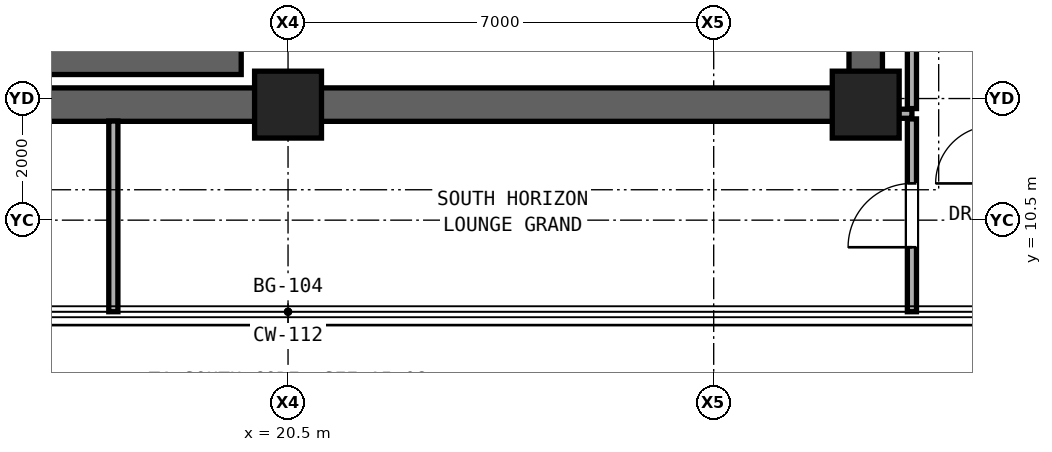
"""IFC4 building model, lengths in metres.
Left out: names, types, materials, properties, quantities, classifications, styles, units other than length and angle.
Written with IfcOpenShell. Run it as: python <this file> out.ifc"""

import sys

from ifc_helpers import new_model, si_unit, direction, frame, frame_2d, origin, origin_2d, place, context, subcontext, project, spatial, rectangle, extrude, element, fill, save


model = new_model("IFC4")
c1 = context("Model", 3, precision=1e-05, world=origin(), true_north=direction((0.0, 1.0)))
c2 = subcontext(c1, "Body", "Model", "MODEL_VIEW")
j1 = project(units=[si_unit("LENGTHUNIT", "METRE"), si_unit("PLANEANGLEUNIT", "RADIAN")], contexts=[c1])
p1 = place(None, origin())
s1 = spatial("IfcSite", under=j1, at=p1, CompositionType="ELEMENT")
p2 = place(p1, origin())
s2 = spatial("IfcBuilding", under=s1, at=p2, CompositionType="ELEMENT")
p3 = place(p2, frame((0.0, 0.0, 141.2)))
s3 = spatial("IfcBuildingStorey", under=s2, at=p3, CompositionType="ELEMENT", Elevation=141.2)
for number, where, z_axis, x_axis in (
    (1, (20.5, 12.4, 0.0), (0.0, 0.0, 1.0), (1.0, 0.0, 0.0)),
    (2, (30.0, 12.4, 0.0), (0.0, 0.0, 1.0), (1.0, 0.0, 0.0)),
):
    element("IfcColumn", number, at=place(p3, frame(where, z_axis=z_axis, x_axis=x_axis)), inside=s3, PredefinedType="COLUMN", context=c2, shape_type="SweptSolid", body=[
        extrude(rectangle(XDim=1.1, YDim=1.1, at=origin_2d()), origin(), (0.0, 0.0, 1.0), 3.3),
    ])
p4 = place(p3, frame((11.0, 12.4, 0.0), z_axis=(0.0, 0.0, 1.0), x_axis=(1.0, 0.0, 0.0)))
e3 = element("IfcWall", 3, at=p4, inside=s3, PredefinedType="SHEAR", context=c2, shape_type="SweptSolid", body=[
    extrude(rectangle(XDim=19.0, YDim=0.55, at=frame_2d((9.5, 0.0))), origin(), (0.0, 0.0, 1.0), 3.08),
])
p5 = place(p3, frame((30.0, 12.4, 0.0), z_axis=(0.0, 0.0, 1.0), x_axis=(0.0, 1.0, 0.0)))
e4 = element("IfcWall", 4, at=p5, inside=s3, PredefinedType="SHEAR", context=c2, shape_type="SweptSolid", body=[
    extrude(rectangle(XDim=6.0, YDim=0.55, at=frame_2d((3.0, 0.0))), origin(), (0.0, 0.0, 1.0), 3.08),
])
p6 = place(p3, frame((30.27, 12.25, 0.0), z_axis=(0.0, 0.0, 1.0), x_axis=(1.0, 0.0, 0.0)))
e5 = element("IfcWall", 5, at=p6, inside=s3, PredefinedType="PARTITIONING", context=c2, shape_type="SweptSolid", body=[
    extrude(rectangle(XDim=0.49, YDim=0.15, at=frame_2d((0.245, 0.0))), origin(), (0.0, 0.0, 1.0), 3.08),
])
p7 = place(p3, frame((11.27, 13.12, 0.0), z_axis=(0.0, 0.0, 1.0), x_axis=(1.0, 0.0, 0.0)))
e6 = element("IfcWall", 6, at=p7, inside=s3, PredefinedType="SHEAR", context=c2, shape_type="SweptSolid", body=[
    extrude(rectangle(XDim=8.46, YDim=0.45, at=frame_2d((4.23, 0.0))), origin(), (0.0, 0.0, 1.0), 3.08),
])
p8 = place(p3, frame((17.627, 8.994, 0.0), z_axis=(0.0, 0.0, 1.0), x_axis=(0.0, 1.0, 0.0)))
e7 = element("IfcWall", 7, at=p8, inside=s3, PredefinedType="PARTITIONING", context=c2, shape_type="SweptSolid", body=[
    extrude(rectangle(XDim=3.136, YDim=0.15, at=frame_2d((1.568, 0.0))), origin(), (0.0, 0.0, 1.0), 3.08),
])
p9 = place(p3, frame((30.76, 8.994, 0.0), z_axis=(0.0, 0.0, 1.0), x_axis=(0.0, 1.0, 0.0)))
e8 = element("IfcWall", 8, at=p9, inside=s3, PredefinedType="PARTITIONING", context=c2, shape_type="SweptSolid", body=[
    extrude(rectangle(XDim=3.171, YDim=0.15, at=frame_2d((1.585, 0.0))), origin(), (0.0, 0.0, 1.0), 3.08),
])
p10 = place(p9, frame((1.061, 0.0, 0.0)))
e9 = element("IfcOpeningElement", 9, at=p10, cuts=e8, PredefinedType="OPENING", context=c2, shape_type="SweptSolid", body=[
    extrude(rectangle(XDim=1.05, YDim=2.2, at=frame_2d((0.525, 1.1))), frame((0.0, 0.085, 0.0), z_axis=(0.0, -1.0, 0.0), x_axis=(1.0, 0.0, 0.0)), (0.0, 0.0, 1.0), 0.17),
])
p11 = place(p3, frame((30.76, 12.335, 0.0), z_axis=(0.0, 0.0, 1.0), x_axis=(0.0, 1.0, 0.0)))
e10 = element("IfcWall", 10, at=p11, inside=s3, PredefinedType="PARTITIONING", context=c2, shape_type="SweptSolid", body=[
    extrude(rectangle(XDim=5.98, YDim=0.15, at=frame_2d((2.99, 0.0))), origin(), (0.0, 0.0, 1.0), 2.456),
])
p12 = place(p10, origin())
e11 = element("IfcDoor", 11, at=p12, inside=s3, OperationType="SINGLE_SWING_LEFT", PredefinedType="DOOR", context=c2, shape_type="SweptSolid", body=[
    extrude(rectangle(XDim=1.05, YDim=2.2, at=frame_2d((0.525, 1.1))), frame((0.0, 0.025, 0.0), z_axis=(0.0, -1.0, 0.0), x_axis=(1.0, 0.0, 0.0)), (0.0, 0.0, 1.0), 0.05),
])
fill(e9, e11)
save(model, sys.argv[1])
